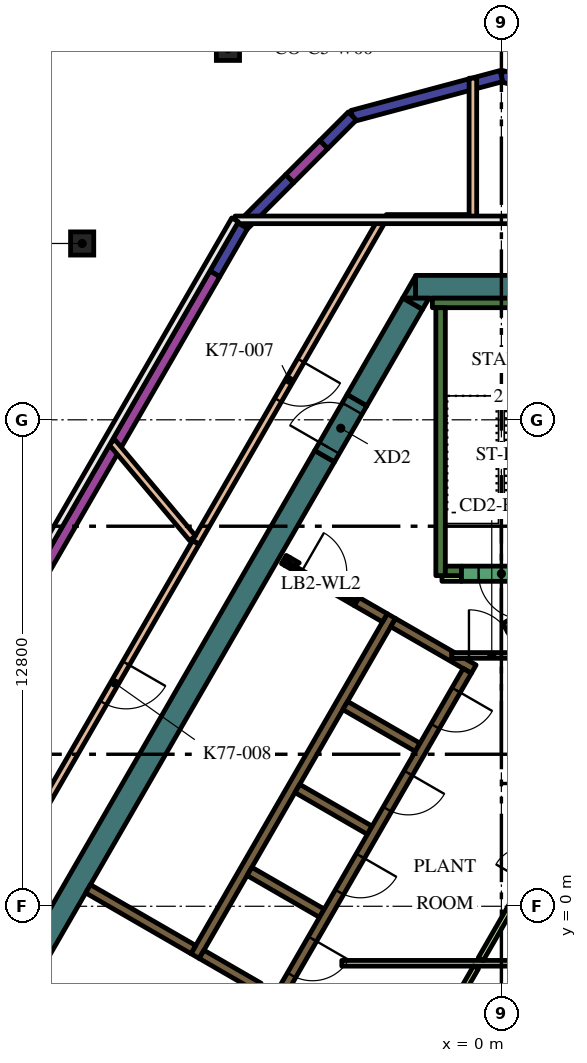
"""IFC4 building model, lengths in metres.
Left out: names, types, materials, properties, quantities, classifications, styles, units other than length and angle.
Written with IfcOpenShell. Run it as: python <this file> out.ifc"""

import sys

from ifc_helpers import new_model, si_unit, direction, frame, frame_2d, origin, origin_2d, place, context, subcontext, project, spatial, polyline, rectangle, hollow_circle, outline, extrude, element, fill, save


model = new_model("IFC4")
c1 = context("Model", 3, precision=1e-05, world=origin(), true_north=direction((0.0, 1.0)))
c2 = subcontext(c1, "Body", "Model", "MODEL_VIEW")
j1 = project(units=[si_unit("LENGTHUNIT", "METRE"), si_unit("PLANEANGLEUNIT", "RADIAN")], contexts=[c1])
p1 = place(None, origin())
s1 = spatial("IfcSite", under=j1, at=p1, CompositionType="ELEMENT")
p2 = place(p1, origin())
s2 = spatial("IfcBuilding", under=s1, at=p2, CompositionType="ELEMENT")
p3 = place(p2, frame((0.0, 0.0, 331.8)))
s3 = spatial("IfcBuildingStorey", under=s2, at=p3, CompositionType="ELEMENT", Elevation=331.8)
for number, where, z_axis, x_axis in (
    (1, (-7.195, 22.561, 0.0), (0.0, 0.0, 1.0), (1.0, 0.0, 0.0)),
    (2, (-11.032, 17.44, 0.0), (0.0, 0.0, 1.0), (1.0, 0.0, 0.0)),
):
    element("IfcColumn", number, at=place(p3, frame(where, z_axis=z_axis, x_axis=x_axis)), inside=s3, PredefinedType="COLUMN", context=c2, shape_type="SweptSolid", body=[
        extrude(hollow_circle(Radius=0.305, WallThickness=0.025, at=origin_2d()), origin(), (0.0, 0.0, 1.0), 4.2),
    ])
p4 = place(p3, frame((-2.258, 16.3, 0.0), z_axis=(0.0, 0.0, 1.0), x_axis=(1.0, 0.0, 0.0)))
e3 = element("IfcWall", 3, at=p4, inside=s3, PredefinedType="SOLIDWALL", context=c2, shape_type="SweptSolid", body=[
    extrude(rectangle(XDim=3.823, YDim=0.6, at=frame_2d((1.912, 0.0))), origin(), (0.0, 0.0, 1.0), 4.2),
])
p5 = place(p3, origin())
e4 = element("IfcWall", 4, at=p5, inside=s3, PredefinedType="SOLIDWALL", context=c2, shape_type="SweptSolid", body=[
    extrude(outline(polyline([(-2.598, 16.0), (-2.26, 16.585), (-2.26, 16.0), (-2.598, 16.0)])), origin(), (0.0, 0.0, 1.0), 4.2),
])
p6 = place(p3, frame((-2.335, 15.855, 0.0), z_axis=(0.0, 0.0, 1.0), x_axis=(-0.499960127962, -0.866048422692, 0.0)))
e5 = element("IfcWall", 5, at=p6, inside=s3, PredefinedType="SOLIDWALL", context=c2, shape_type="SweptSolid", body=[
    extrude(rectangle(XDim=2.934, YDim=0.6, at=frame_2d((1.467, 0.0))), origin(), (0.0, 0.0, 1.0), 4.2),
])
e6 = element("IfcWall", 6, at=p5, inside=s3, PredefinedType="SOLIDWALL", context=c2, shape_type="SweptSolid", body=[
    extrude(outline(polyline([(-1.905, 16.0), (-2.074, 15.707), (-2.581, 16.0), (-1.905, 16.0)])), origin(), (0.0, 0.0, 1.0), 4.2),
])
p7 = place(p3, frame((-4.652, 11.842, 0.0), z_axis=(0.0, 0.0, 1.0), x_axis=(-0.500003640647, -0.866023301845, 0.0)))
e7 = element("IfcWall", 7, at=p7, inside=s3, PredefinedType="SOLIDWALL", context=c2, shape_type="SweptSolid", body=[
    extrude(rectangle(XDim=15.858, YDim=0.6, at=frame_2d((7.929, 0.0))), origin(), (0.0, 0.0, 1.0), 4.2),
])
p8 = place(p3, frame((-1.817, 15.875, 0.0), z_axis=(0.0, 0.0, 1.0), x_axis=(1.0, 0.0, 0.0)))
e8 = element("IfcWall", 8, at=p8, inside=s3, PredefinedType="SOLIDWALL", context=c2, shape_type="SweptSolid", body=[
    extrude(rectangle(XDim=3.634, YDim=0.25, at=frame_2d((1.817, 0.0))), origin(), (0.0, 0.0, 1.0), 4.2),
])
p9 = place(p3, frame((-1.6, 8.7, 0.0), z_axis=(0.0, 0.0, 1.0), x_axis=(0.0, 1.0, 0.0)))
e9 = element("IfcWall", 9, at=p9, inside=s3, PredefinedType="SOLIDWALL", context=c2, shape_type="SweptSolid", body=[
    extrude(rectangle(XDim=7.05, YDim=0.25, at=frame_2d((3.525, 0.0))), origin(), (0.0, 0.0, 1.0), 4.2),
])
p10 = place(p3, frame((-1.475, 8.825, 0.0), z_axis=(0.0, 0.0, 1.0), x_axis=(1.0, 0.0, 0.0)))
e10 = element("IfcWall", 10, at=p10, inside=s3, PredefinedType="SOLIDWALL", context=c2, shape_type="SweptSolid", body=[
    extrude(rectangle(XDim=0.425, YDim=0.25, at=frame_2d((0.212, 0.0))), origin(), (0.0, 0.0, 1.0), 4.2),
])
p11 = place(p3, frame((3.1, 9.064, 0.0), z_axis=(0.0, 0.0, 1.0), x_axis=(-0.866033137035, -0.499986605379, 0.0)))
e11 = element("IfcWall", 11, at=p11, inside=s3, PredefinedType="SOLIDWALL", context=c2, shape_type="SweptSolid", body=[
    extrude(rectangle(XDim=3.467, YDim=0.25, at=frame_2d((1.733, 0.0))), origin(), (0.0, 0.0, 1.0), 4.2),
])
p12 = place(p3, frame((-8.06, -1.311, 0.0), z_axis=(0.0, 0.0, 1.0), x_axis=(0.50000273126, 0.866023826885, 0.0)))
e12 = element("IfcWall", 12, at=p12, inside=s3, PredefinedType="SOLIDWALL", context=c2, shape_type="SweptSolid", body=[
    extrude(rectangle(XDim=10.33, YDim=0.25, at=frame_2d((5.165, 0.0))), origin(), (0.0, 0.0, 1.0), 4.2),
])
e13 = element("IfcWall", 13, at=p5, inside=s3, PredefinedType="SOLIDWALL", context=c2, shape_type="SweptSolid", body=[
    extrude(outline(polyline([(-2.912, 7.356), (-2.787, 7.573), (-1.232, 6.675), (-1.303, 6.675), (-1.304, 6.675), (-1.304, 6.675), (-1.304, 6.525), (-1.304, 6.525), (-1.303, 6.525), (-0.971, 6.525), (-0.665, 6.348), (-0.79, 6.132), (-1.007, 6.257), (-1.007, 6.257), (-2.912, 7.356)])), origin(), (0.0, 0.0, 1.0), 4.2),
])
for number, where, z_axis, x_axis in (
    (14, (-2.204, 4.182, 0.0), (0.0, 0.0, 1.0), (-0.866, 0.5, 0.0)),
    (15, (-5.369, 3.1, 0.0), (0.0, 0.0, 1.0), (0.866, -0.5, 0.0)),
    (16, (-4.724, -0.182, 0.0), (0.0, 0.0, 1.0), (-0.866, 0.5, 0.0)),
):
    element("IfcWall", number, at=place(p3, frame(where, z_axis=z_axis, x_axis=x_axis)), inside=s3, PredefinedType="SOLIDWALL", context=c2, shape_type="SweptSolid", body=[
        extrude(rectangle(XDim=2.2, YDim=0.25, at=frame_2d((1.1, 0.0))), origin(), (0.0, 0.0, 1.0), 4.2),
    ])
p13 = place(p3, frame((-7.889, -1.265, 0.0), z_axis=(0.0, 0.0, 1.0), x_axis=(0.865986741702, -0.500066958712, 0.0)))
e17 = element("IfcWall", 17, at=p13, inside=s3, PredefinedType="SOLIDWALL", context=c2, shape_type="SweptSolid", body=[
    extrude(rectangle(XDim=1.738, YDim=0.25, at=frame_2d((0.869, 0.0))), origin(), (0.0, 0.0, 1.0), 4.2),
])
p14 = place(p3, frame((-8.106, -1.14, 0.0), z_axis=(0.0, 0.0, 1.0), x_axis=(-0.866008981251, 0.500028443584, 0.0)))
e18 = element("IfcWall", 18, at=p14, inside=s3, PredefinedType="SOLIDWALL", context=c2, shape_type="SweptSolid", body=[
    extrude(rectangle(XDim=3.2, YDim=0.25, at=frame_2d((1.6, 0.0))), origin(), (0.0, 0.0, 1.0), 4.2),
])
p15 = place(p3, frame((-5.725, 9.125, 0.0), z_axis=(0.0, 0.0, 1.0), x_axis=(0.866185586049, -0.49972245349, 0.0)))
e19 = element("IfcWall", 19, at=p15, inside=s3, PredefinedType="SOLIDWALL", context=c2, shape_type="SweptSolid", body=[
    extrude(rectangle(XDim=0.11, YDim=0.25, at=frame_2d((0.055, 0.0))), origin(), (0.0, 0.0, 1.0), 4.2),
])
p16 = place(p3, frame((-3.066, 7.59, 0.0), z_axis=(0.0, 0.0, 1.0), x_axis=(-0.866081358704, 0.49990307071, 0.0)))
e20 = element("IfcWall", 20, at=p16, inside=s3, PredefinedType="SOLIDWALL", context=c2, shape_type="SweptSolid", body=[
    extrude(rectangle(XDim=0.858, YDim=0.25, at=frame_2d((0.429, 0.0))), origin(), (0.0, 0.0, 1.0), 4.2),
])
e21 = element("IfcWall", 21, at=p5, inside=s3, PredefinedType="SOLIDWALL", context=c2, shape_type="SweptSolid", body=[
    extrude(outline(polyline([(-3.748, 8.128), (-3.813, 8.015), (-4.027, 8.139), (-4.017, 8.156), (-4.008, 8.173), (-4.0, 8.192), (-3.995, 8.21), (-3.991, 8.23), (-3.99, 8.25), (-3.99, 8.268), (-3.748, 8.128)])), origin(), (0.0, 0.0, 1.0), 4.2),
])
e22 = element("IfcWall", 22, at=p5, inside=s3, PredefinedType="SOLIDWALL", context=c2, shape_type="SweptSolid", body=[
    extrude(outline(polyline([(-5.689, 8.96), (-5.69, 8.961), (-5.565, 9.177), (-5.319, 9.035), (-5.335, 9.026), (-5.351, 9.015), (-5.366, 9.002), (-5.379, 8.988), (-5.392, 8.972), (-5.402, 8.956), (-5.412, 8.939), (-5.629, 9.064), (-5.629, 9.064), (-5.689, 8.96)])), origin(), (0.0, 0.0, 1.0), 4.2),
])
p17 = place(p3, frame((-1.564, 8.625, 0.0), z_axis=(0.0, 0.0, 1.0), x_axis=(1.0, 0.0, 0.0)))
e23 = element("IfcWall", 23, at=p17, inside=s3, PredefinedType="PARTITIONING", context=c2, shape_type="SweptSolid", body=[
    extrude(rectangle(XDim=0.514, YDim=0.15, at=frame_2d((0.257, 0.0))), origin(), (0.0, 0.0, 1.0), 3.45),
])
p18 = place(p3, frame((-4.2, -1.5, 0.0), z_axis=(0.0, 0.0, 1.0), x_axis=(1.0, 0.0, 0.0)))
e24 = element("IfcWall", 24, at=p18, inside=s3, PredefinedType="PARTITIONING", context=c2, shape_type="SweptSolid", body=[
    extrude(rectangle(XDim=9.359, YDim=0.15, at=frame_2d((4.68, 0.0))), origin(), (0.0, 0.0, 1.0), 3.45),
])
p19 = place(p3, frame((-0.544, -1.393, 0.0), z_axis=(0.0, 0.0, 1.0), x_axis=(0.499928740635, 0.866066541489, 0.0)))
e25 = element("IfcWall", 25, at=p19, inside=s3, PredefinedType="PARTITIONING", context=c2, shape_type="SweptSolid", body=[
    extrude(rectangle(XDim=1.912, YDim=0.15, at=frame_2d((0.956, 0.0))), origin(), (0.0, 0.0, 1.0), 3.45),
])
p20 = place(p3, frame((-0.668, -1.607, 0.0), z_axis=(0.0, 0.0, 1.0), x_axis=(-0.50003736129, -0.866003832159, 0.0)))
e26 = element("IfcWall", 26, at=p20, inside=s3, PredefinedType="PARTITIONING", context=c2, shape_type="SweptSolid", body=[
    extrude(rectangle(XDim=2.438, YDim=0.15, at=frame_2d((1.219, 0.0))), origin(), (0.0, 0.0, 1.0), 3.45),
])
p21 = place(p3, frame((-0.898, 6.194, 0.0), z_axis=(0.0, 0.0, 1.0), x_axis=(-0.499996202215, -0.866027596426, 0.0)))
e27 = element("IfcWall", 27, at=p21, inside=s3, PredefinedType="SOLIDWALL", context=c2, shape_type="SweptSolid", body=[
    extrude(rectangle(XDim=9.83, YDim=0.25, at=frame_2d((4.915, 0.0))), origin(), (0.0, 0.0, 1.0), 4.2),
])
p22 = place(p21, frame((0.585, 0.0, 0.0)))
e28 = element("IfcOpeningElement", 28, at=p22, cuts=e27, PredefinedType="OPENING", context=c2, shape_type="SweptSolid", body=[
    extrude(rectangle(XDim=1.1, YDim=2.1, at=frame_2d((0.55, 1.05))), frame((0.0, 0.135, 0.0), z_axis=(0.0, -1.0, 0.0), x_axis=(1.0, 0.0, 0.0)), (0.0, 0.0, 1.0), 0.27),
])
p23 = place(p21, frame((3.105, 0.0, 0.0)))
e29 = element("IfcOpeningElement", 29, at=p23, cuts=e27, PredefinedType="OPENING", context=c2, shape_type="SweptSolid", body=[
    extrude(rectangle(XDim=1.1, YDim=2.1, at=frame_2d((0.55, 1.05))), frame((0.0, 0.135, 0.0), z_axis=(0.0, -1.0, 0.0), x_axis=(1.0, 0.0, 0.0)), (0.0, 0.0, 1.0), 0.27),
])
p24 = place(p21, frame((5.625, 0.0, 0.0)))
e30 = element("IfcOpeningElement", 30, at=p24, cuts=e27, PredefinedType="OPENING", context=c2, shape_type="SweptSolid", body=[
    extrude(rectangle(XDim=1.1, YDim=2.1, at=frame_2d((0.55, 1.05))), frame((0.0, 0.135, 0.0), z_axis=(0.0, -1.0, 0.0), x_axis=(1.0, 0.0, 0.0)), (0.0, 0.0, 1.0), 0.27),
])
p25 = place(p21, frame((8.145, 0.0, 0.0)))
e31 = element("IfcOpeningElement", 31, at=p25, cuts=e27, PredefinedType="OPENING", context=c2, shape_type="SweptSolid", body=[
    extrude(rectangle(XDim=1.1, YDim=2.1, at=frame_2d((0.55, 1.05))), frame((0.0, 0.135, 0.0), z_axis=(0.0, -1.0, 0.0), x_axis=(1.0, 0.0, 0.0)), (0.0, 0.0, 1.0), 0.27),
])
p26 = place(p3, frame((1.05, 8.75, 0.0), z_axis=(0.0, 0.0, 1.0), x_axis=(-1.0, 0.0, 0.0)))
e32 = element("IfcWall", 32, at=p26, inside=s3, PredefinedType="SOLIDWALL", context=c2, shape_type="SweptSolid", body=[
    extrude(rectangle(XDim=2.1, YDim=0.4, at=frame_2d((1.05, 0.0))), origin(), (0.0, 0.0, 1.0), 4.2),
])
p27 = place(p26, frame((0.45, 0.0, 0.0)))
e33 = element("IfcOpeningElement", 33, at=p27, cuts=e32, PredefinedType="OPENING", context=c2, shape_type="SweptSolid", body=[
    extrude(rectangle(XDim=1.2, YDim=2.1, at=frame_2d((0.6, 1.05))), frame((0.0, 0.21, 0.0), z_axis=(0.0, -1.0, 0.0), x_axis=(1.0, 0.0, 0.0)), (0.0, 0.0, 1.0), 0.42),
])
p28 = place(p3, frame((-1.303, 6.6, 0.0), z_axis=(0.0, 0.0, 1.0), x_axis=(1.0, 0.0, 0.0)))
e34 = element("IfcWall", 34, at=p28, inside=s3, PredefinedType="PARTITIONING", context=c2, shape_type="SweptSolid", body=[
    extrude(rectangle(XDim=2.1, YDim=0.15, at=frame_2d((1.05, 0.0))), origin(), (0.0, 0.0, 1.0), 4.2),
])
p29 = place(p28, frame((0.45, 0.0, 0.0)))
e35 = element("IfcOpeningElement", 35, at=p29, cuts=e34, PredefinedType="OPENING", context=c2, shape_type="SweptSolid", body=[
    extrude(rectangle(XDim=1.2, YDim=2.1, at=frame_2d((0.6, 1.05))), frame((0.0, 0.085, 0.0), z_axis=(0.0, -1.0, 0.0), x_axis=(1.0, 0.0, 0.0)), (0.0, 0.0, 1.0), 0.17),
])
p30 = place(p3, frame((-5.659, 9.012, 0.0), z_axis=(0.0, 0.0, 1.0), x_axis=(0.866009402589, -0.500027713859, 0.0)))
e36 = element("IfcWall", 36, at=p30, inside=s3, PredefinedType="PARTITIONING", context=c2, shape_type="SweptSolid", body=[
    extrude(rectangle(XDim=2.1, YDim=0.12, at=frame_2d((1.05, 0.0))), origin(), (0.0, 0.0, 1.0), 3.45),
])
p31 = place(p30, frame((0.45, 0.0, 0.0)))
e37 = element("IfcOpeningElement", 37, at=p31, cuts=e36, PredefinedType="OPENING", context=c2, shape_type="SweptSolid", body=[
    extrude(rectangle(XDim=1.2, YDim=2.1, at=frame_2d((0.6, 1.05))), frame((0.0, 0.07, 0.0), z_axis=(0.0, -1.0, 0.0), x_axis=(1.0, 0.0, 0.0)), (0.0, 0.0, 1.0), 0.14),
])
p32 = place(p3, frame((-4.652, 11.842, 0.0), z_axis=(0.0, 0.0, 1.0), x_axis=(0.500062241894, 0.865989465428, 0.0)))
e38 = element("IfcWall", 38, at=p32, inside=s3, PredefinedType="SOLIDWALL", context=c2, shape_type="SweptSolid", body=[
    extrude(rectangle(XDim=1.7, YDim=0.6, at=frame_2d((0.85, 0.0))), origin(), (0.0, 0.0, 1.0), 4.2),
])
p33 = place(p32, frame((0.25, 0.0, 0.0)))
e39 = element("IfcOpeningElement", 39, at=p33, cuts=e38, PredefinedType="OPENING", context=c2, shape_type="SweptSolid", body=[
    extrude(rectangle(XDim=1.2, YDim=2.1, at=frame_2d((0.6, 1.05))), frame((0.0, 0.31, 0.0), z_axis=(0.0, -1.0, 0.0), x_axis=(1.0, 0.0, 0.0)), (0.0, 0.0, 1.0), 0.62),
])
p34 = place(p3, frame((-3.118, 18.1, 0.0), z_axis=(0.0, 0.0, 1.0), x_axis=(-0.500003092839, -0.866023618125, 0.0)))
e40 = element("IfcWall", 40, at=p34, inside=s3, PredefinedType="PARTITIONING", context=c2, shape_type="SweptSolid", body=[
    extrude(rectangle(XDim=9.84, YDim=0.2, at=frame_2d((4.92, 0.0))), origin(), (0.0, 0.0, 1.0), 3.45),
])
p35 = place(p34, frame((4.32, 0.0, 0.0)))
e41 = element("IfcOpeningElement", 41, at=p35, cuts=e40, PredefinedType="OPENING", context=c2, shape_type="SweptSolid", body=[
    extrude(rectangle(XDim=1.2, YDim=2.1, at=frame_2d((0.6, 1.05))), frame((0.0, 0.11, 0.0), z_axis=(0.0, -1.0, 0.0), x_axis=(1.0, 0.0, 0.0)), (0.0, 0.0, 1.0), 0.22),
])
p36 = place(p3, frame((-8.042, 9.57, 0.0), z_axis=(0.0, 0.0, 1.0), x_axis=(-0.499966798825, -0.866044571643, 0.0)))
e42 = element("IfcWall", 42, at=p36, inside=s3, PredefinedType="PARTITIONING", context=c2, shape_type="SweptSolid", body=[
    extrude(rectangle(XDim=8.534, YDim=0.2, at=frame_2d((4.267, 0.0))), origin(), (0.0, 0.0, 1.0), 3.45),
])
p37 = place(p36, frame((3.667, 0.0, 0.0)))
e43 = element("IfcOpeningElement", 43, at=p37, cuts=e42, PredefinedType="OPENING", context=c2, shape_type="SweptSolid", body=[
    extrude(rectangle(XDim=1.2, YDim=2.1, at=frame_2d((0.6, 1.05))), frame((0.0, 0.11, 0.0), z_axis=(0.0, -1.0, 0.0), x_axis=(1.0, 0.0, 0.0)), (0.0, 0.0, 1.0), 0.22),
])
p38 = place(p3, frame((-0.75, 18.1, 0.0), z_axis=(0.0, 0.0, 1.0), x_axis=(0.0, 1.0, 0.0)))
e44 = element("IfcWall", 44, at=p38, inside=s3, PredefinedType="PARTITIONING", context=c2, shape_type="SweptSolid", body=[
    extrude(rectangle(XDim=3.688, YDim=0.2, at=frame_2d((1.844, 0.0))), origin(), (0.0, 0.0, 1.0), 3.45),
])
p39 = place(p3, frame((-8.127, 9.686, 0.0), z_axis=(0.0, 0.0, 1.0), x_axis=(-0.642778991378, 0.766051674656, 0.0)))
e45 = element("IfcWall", 45, at=p39, inside=s3, PredefinedType="PARTITIONING", context=c2, shape_type="SweptSolid", body=[
    extrude(rectangle(XDim=3.3, YDim=0.2, at=frame_2d((1.65, 0.0))), origin(), (0.0, 0.0, 1.0), 3.45),
])
p40 = place(p3, frame((-3.028, 18.1, 0.0), z_axis=(0.0, 0.0, 1.0), x_axis=(1.0, 0.0, 0.0)))
e46 = element("IfcWall", 46, at=p40, inside=s3, PredefinedType="PARTITIONING", context=c2, shape_type="SweptSolid", body=[
    extrude(rectangle(XDim=2.177, YDim=0.2, at=frame_2d((1.089, 0.0))), origin(), (0.0, 0.0, 1.0), 3.45),
])
for number, where, z_axis, x_axis in (
    (47, (3.922, 20.794, 0.0), (0.0, 0.0, 1.0), (-0.966, 0.259, 0.0)),
    (48, (0.0, 21.845, 0.0), (0.0, 0.0, 1.0), (-0.966, -0.259, 0.0)),
):
    element("IfcWall", number, at=place(p3, frame(where, z_axis=z_axis, x_axis=x_axis)), inside=s3, PredefinedType="SOLIDWALL", context=c2, shape_type="SweptSolid", body=[
        extrude(rectangle(XDim=4.061, YDim=0.3, at=frame_2d((2.03, 0.0))), origin(), (0.0, 0.0, 1.0), 3.95),
    ])
p41 = place(p3, frame((-3.922, 20.794, 0.0), z_axis=(0.0, 0.0, 1.0), x_axis=(-0.707106781187, -0.707106781187, 0.0)))
e49 = element("IfcWall", 49, at=p41, inside=s3, PredefinedType="SOLIDWALL", context=c2, shape_type="SweptSolid", body=[
    extrude(rectangle(XDim=1.065, YDim=0.3, at=frame_2d((0.532, 0.0))), origin(), (0.0, 0.0, 1.0), 3.95),
])
p42 = place(p3, frame((-4.675, 20.041, 0.0), z_axis=(0.0, 0.0, 1.0), x_axis=(-0.707106781187, -0.707106781187, 0.0)))
e50 = element("IfcWall", 50, at=p42, inside=s3, PredefinedType="SOLIDWALL", context=c2, shape_type="SweptSolid", body=[
    extrude(rectangle(XDim=1.264, YDim=0.3, at=frame_2d((0.632, 0.0))), origin(), (0.0, 0.0, 1.0), 3.45),
])
p43 = place(p3, frame((-5.569, 19.147, 0.0), z_axis=(0.0, 0.0, 1.0), x_axis=(-0.707106781187, -0.707106781187, 0.0)))
e51 = element("IfcWall", 51, at=p43, inside=s3, PredefinedType="SOLIDWALL", context=c2, shape_type="SweptSolid", body=[
    extrude(rectangle(XDim=1.752, YDim=0.3, at=frame_2d((0.876, 0.0))), origin(), (0.0, 0.0, 1.0), 3.95),
])
p44 = place(p3, frame((-6.808, 17.908, 0.0), z_axis=(0.0, 0.0, 1.0), x_axis=(-0.499977492351, -0.866038398192, 0.0)))
e52 = element("IfcWall", 52, at=p44, inside=s3, PredefinedType="SOLIDWALL", context=c2, shape_type="SweptSolid", body=[
    extrude(rectangle(XDim=1.464, YDim=0.3, at=frame_2d((0.732, 0.0))), origin(), (0.0, 0.0, 1.0), 3.95),
])
p45 = place(p3, frame((-7.54, 16.64, 0.0), z_axis=(0.0, 0.0, 1.0), x_axis=(-0.500002158106, -0.866024157798, 0.0)))
e53 = element("IfcWall", 53, at=p45, inside=s3, PredefinedType="SOLIDWALL", context=c2, shape_type="SweptSolid", body=[
    extrude(rectangle(XDim=21.282, YDim=0.3, at=frame_2d((10.641, 0.0))), origin(), (0.0, 0.0, 1.0), 3.45),
])
p46 = place(p22, origin())
e54 = element("IfcDoor", 54, at=p46, inside=s3, OperationType="DOUBLE_DOOR_SLIDING", PredefinedType="DOOR", context=c2, shape_type="SweptSolid", body=[
    extrude(rectangle(XDim=1.1, YDim=2.1, at=frame_2d((0.55, 1.05))), frame((0.0, 0.025, 0.0), z_axis=(0.0, -1.0, 0.0), x_axis=(1.0, 0.0, 0.0)), (0.0, 0.0, 1.0), 0.05),
])
fill(e28, e54)
p47 = place(p23, origin())
e55 = element("IfcDoor", 55, at=p47, inside=s3, OperationType="DOUBLE_DOOR_SLIDING", PredefinedType="DOOR", context=c2, shape_type="SweptSolid", body=[
    extrude(rectangle(XDim=1.1, YDim=2.1, at=frame_2d((0.55, 1.05))), frame((0.0, 0.025, 0.0), z_axis=(0.0, -1.0, 0.0), x_axis=(1.0, 0.0, 0.0)), (0.0, 0.0, 1.0), 0.05),
])
fill(e29, e55)
p48 = place(p24, origin())
e56 = element("IfcDoor", 56, at=p48, inside=s3, OperationType="DOUBLE_DOOR_SLIDING", PredefinedType="DOOR", context=c2, shape_type="SweptSolid", body=[
    extrude(rectangle(XDim=1.1, YDim=2.1, at=frame_2d((0.55, 1.05))), frame((0.0, 0.025, 0.0), z_axis=(0.0, -1.0, 0.0), x_axis=(1.0, 0.0, 0.0)), (0.0, 0.0, 1.0), 0.05),
])
fill(e30, e56)
p49 = place(p25, origin())
e57 = element("IfcDoor", 57, at=p49, inside=s3, OperationType="DOUBLE_DOOR_SLIDING", PredefinedType="DOOR", context=c2, shape_type="SweptSolid", body=[
    extrude(rectangle(XDim=1.1, YDim=2.1, at=frame_2d((0.55, 1.05))), frame((0.0, 0.025, 0.0), z_axis=(0.0, -1.0, 0.0), x_axis=(1.0, 0.0, 0.0)), (0.0, 0.0, 1.0), 0.05),
])
fill(e31, e57)
p50 = place(p27, origin())
e58 = element("IfcDoor", 58, at=p50, inside=s3, OperationType="SINGLE_SWING_LEFT", PredefinedType="DOOR", context=c2, shape_type="SweptSolid", body=[
    extrude(rectangle(XDim=1.2, YDim=2.1, at=frame_2d((0.6, 1.05))), frame((0.0, 0.025, 0.0), z_axis=(0.0, -1.0, 0.0), x_axis=(1.0, 0.0, 0.0)), (0.0, 0.0, 1.0), 0.05),
])
fill(e33, e58)
p51 = place(p29, origin())
e59 = element("IfcDoor", 59, at=p51, inside=s3, OperationType="SINGLE_SWING_LEFT", PredefinedType="DOOR", context=c2, shape_type="SweptSolid", body=[
    extrude(rectangle(XDim=1.2, YDim=2.1, at=frame_2d((0.6, 1.05))), frame((0.0, 0.025, 0.0), z_axis=(0.0, -1.0, 0.0), x_axis=(1.0, 0.0, 0.0)), (0.0, 0.0, 1.0), 0.05),
])
fill(e35, e59)
p52 = place(p31, origin())
e60 = element("IfcDoor", 60, at=p52, inside=s3, OperationType="SINGLE_SWING_LEFT", PredefinedType="DOOR", context=c2, shape_type="SweptSolid", body=[
    extrude(rectangle(XDim=1.2, YDim=2.1, at=frame_2d((0.6, 1.05))), frame((0.0, 0.025, 0.0), z_axis=(0.0, -1.0, 0.0), x_axis=(1.0, 0.0, 0.0)), (0.0, 0.0, 1.0), 0.05),
])
fill(e37, e60)
p53 = place(p33, origin())
e61 = element("IfcDoor", 61, at=p53, inside=s3, OperationType="SINGLE_SWING_LEFT", PredefinedType="DOOR", context=c2, shape_type="SweptSolid", body=[
    extrude(rectangle(XDim=1.2, YDim=2.1, at=frame_2d((0.6, 1.05))), frame((0.0, 0.025, 0.0), z_axis=(0.0, -1.0, 0.0), x_axis=(1.0, 0.0, 0.0)), (0.0, 0.0, 1.0), 0.05),
])
fill(e39, e61)
p54 = place(p35, origin())
e62 = element("IfcDoor", 62, at=p54, inside=s3, OperationType="SINGLE_SWING_RIGHT", PredefinedType="DOOR", context=c2, shape_type="SweptSolid", body=[
    extrude(rectangle(XDim=1.2, YDim=2.1, at=frame_2d((0.6, 1.05))), frame((0.0, 0.025, 0.0), z_axis=(0.0, -1.0, 0.0), x_axis=(1.0, 0.0, 0.0)), (0.0, 0.0, 1.0), 0.05),
])
fill(e41, e62)
p55 = place(p37, origin())
e63 = element("IfcDoor", 63, at=p55, inside=s3, OperationType="SINGLE_SWING_RIGHT", PredefinedType="DOOR", context=c2, shape_type="SweptSolid", body=[
    extrude(rectangle(XDim=1.2, YDim=2.1, at=frame_2d((0.6, 1.05))), frame((0.0, 0.025, 0.0), z_axis=(0.0, -1.0, 0.0), x_axis=(1.0, 0.0, 0.0)), (0.0, 0.0, 1.0), 0.05),
])
fill(e43, e63)
save(model, sys.argv[1])
